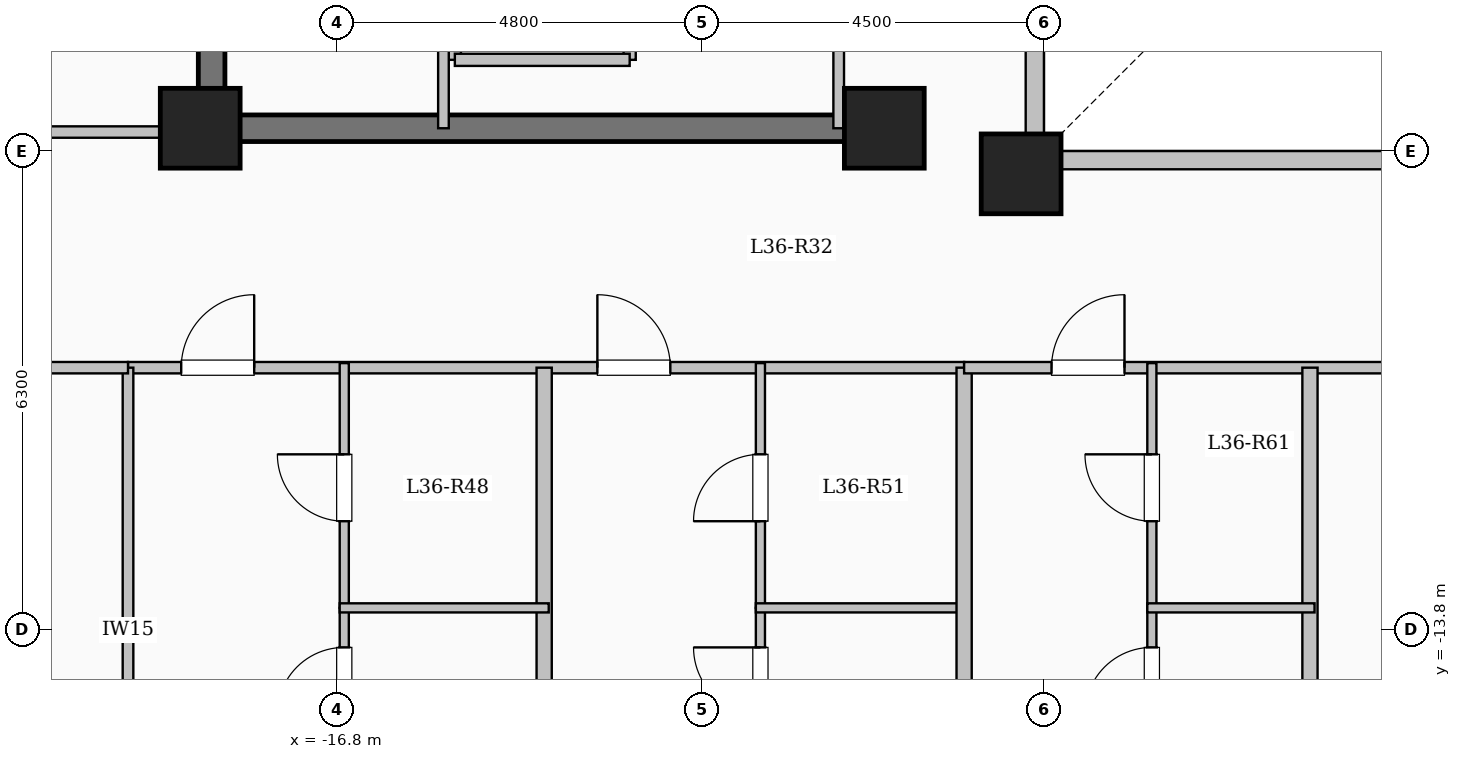
"""IFC4 building model, lengths in metres.
Left out: names, types, materials, properties, quantities, classifications, styles, units other than length and angle.
Written with IfcOpenShell. Run it as: python <this file> out.ifc"""

import sys

from ifc_helpers import new_model, si_unit, direction, frame, frame_2d, origin, origin_2d, place, context, subcontext, project, spatial, rectangle, extrude, element, fill, save


model = new_model("IFC4")
c1 = context("Model", 3, precision=1e-05, world=origin(), true_north=direction((0.0, 1.0)))
c2 = subcontext(c1, "Body", "Model", "MODEL_VIEW")
j1 = project(units=[si_unit("LENGTHUNIT", "METRE"), si_unit("PLANEANGLEUNIT", "RADIAN")], contexts=[c1])
p1 = place(None, origin())
s1 = spatial("IfcSite", under=j1, at=p1, CompositionType="ELEMENT")
p2 = place(p1, origin())
s2 = spatial("IfcBuilding", under=s1, at=p2, CompositionType="ELEMENT")
p3 = place(p2, frame((0.0, 0.0, 135.95)))
s3 = spatial("IfcBuildingStorey", under=s2, at=p3, CompositionType="ELEMENT", Elevation=135.95)
for number, where, z_axis, x_axis in (
    (1, (-7.8, -7.8, 0.0), (0.0, 0.0, 1.0), (1.0, 0.0, 0.0)),
    (2, (-9.6, -7.2, 0.0), (0.0, 0.0, 1.0), (1.0, 0.0, 0.0)),
    (3, (-18.6, -7.2, 0.0), (0.0, 0.0, 1.0), (1.0, 0.0, 0.0)),
):
    element("IfcColumn", number, at=place(p3, frame(where, z_axis=z_axis, x_axis=x_axis)), inside=s3, PredefinedType="COLUMN", context=c2, shape_type="SweptSolid", body=[
        extrude(rectangle(XDim=1.05, YDim=1.05, at=origin_2d()), origin(), (0.0, 0.0, 1.0), 3.35),
    ])
p4 = place(p3, frame((-7.62, -7.62, 0.0), z_axis=(0.0, 0.0, 1.0), x_axis=(1.0, 0.0, 0.0)))
e4 = element("IfcWall", 4, at=p4, inside=s3, PredefinedType="SOLIDWALL", context=c2, shape_type="SweptSolid", body=[
    extrude(rectangle(XDim=15.24, YDim=0.24, at=frame_2d((7.62, 0.0))), origin(), (0.0, 0.0, 1.0), 3.1),
])
p5 = place(p4, frame((6.92, 0.0, 0.95)))
e5 = element("IfcOpeningElement", 5, at=p5, cuts=e4, PredefinedType="OPENING", context=c2, shape_type="SweptSolid", body=[
    extrude(rectangle(XDim=1.4, YDim=1.5, at=frame_2d((0.7, 0.75))), frame((0.0, 0.13, 0.0), z_axis=(0.0, -1.0, 0.0), x_axis=(1.0, 0.0, 0.0)), (0.0, 0.0, 1.0), 0.26),
])
p6 = place(p3, frame((-7.62, 7.62, 0.0), z_axis=(0.0, 0.0, 1.0), x_axis=(0.0, -1.0, 0.0)))
e6 = element("IfcWall", 6, at=p6, inside=s3, PredefinedType="SOLIDWALL", context=c2, shape_type="SweptSolid", body=[
    extrude(rectangle(XDim=15.24, YDim=0.24, at=frame_2d((7.62, 0.0))), origin(), (0.0, 0.0, 1.0), 3.1),
])
p7 = place(p6, frame((6.92, 0.0, 0.95)))
e7 = element("IfcOpeningElement", 7, at=p7, cuts=e6, PredefinedType="OPENING", context=c2, shape_type="SweptSolid", body=[
    extrude(rectangle(XDim=1.4, YDim=1.5, at=frame_2d((0.7, 0.75))), frame((0.0, 0.13, 0.0), z_axis=(0.0, -1.0, 0.0), x_axis=(1.0, 0.0, 0.0)), (0.0, 0.0, 1.0), 0.26),
])
for number, where, z_axis, x_axis in (
    (8, (-15.25, -6.3, 0.0), (0.0, 0.0, 1.0), (0.0, 1.0, 0.0)),
    (9, (-12.95, -6.3, 0.0), (0.0, 0.0, 1.0), (0.0, 1.0, 0.0)),
):
    element("IfcWall", number, at=place(p3, frame(where, z_axis=z_axis, x_axis=x_axis)), inside=s3, PredefinedType="SOLIDWALL", context=c2, shape_type="SweptSolid", body=[
        extrude(rectangle(XDim=2.6, YDim=0.16, at=frame_2d((1.3, 0.0))), origin(), (0.0, 0.0, 1.0), 3.1),
    ])
p8 = place(p3, frame((-15.25, -6.3, 0.0), z_axis=(0.0, 0.0, 1.0), x_axis=(1.0, 0.0, 0.0)))
e10 = element("IfcWall", 10, at=p8, inside=s3, PredefinedType="SOLIDWALL", context=c2, shape_type="SweptSolid", body=[
    extrude(rectangle(XDim=2.3, YDim=0.16, at=frame_2d((1.15, 0.0))), origin(), (0.0, 0.0, 1.0), 3.1),
])
p9 = place(p3, frame((-18.45, -7.375, 0.0), z_axis=(0.0, 0.0, 1.0), x_axis=(0.0, 1.0, 0.0)))
e11 = element("IfcWall", 11, at=p9, inside=s3, PredefinedType="SHEAR", context=c2, shape_type="SweptSolid", body=[
    extrude(rectangle(XDim=14.05, YDim=0.35, at=frame_2d((7.025, 0.0))), origin(), (0.0, 0.0, 1.0), 3.35),
])
p10 = place(p3, frame((-18.625, -7.2, 0.0), z_axis=(0.0, 0.0, 1.0), x_axis=(1.0, 0.0, 0.0)))
e12 = element("IfcWall", 12, at=p10, inside=s3, PredefinedType="SHEAR", context=c2, shape_type="SweptSolid", body=[
    extrude(rectangle(XDim=8.55, YDim=0.35, at=frame_2d((4.275, 0.0))), origin(), (0.0, 0.0, 1.0), 3.35),
])
p11 = place(p3, frame((-15.4, -7.2, 0.0), z_axis=(0.0, 0.0, 1.0), x_axis=(0.0, 1.0, 0.0)))
e13 = element("IfcWall", 13, at=p11, inside=s3, PredefinedType="PARTITIONING", context=c2, shape_type="SweptSolid", body=[
    extrude(rectangle(XDim=10.45, YDim=0.14, at=frame_2d((5.225, 0.0))), origin(), (0.0, 0.0, 1.0), 3.1),
])
p12 = place(p11, frame((9.25, 0.0, 0.0)))
e14 = element("IfcOpeningElement", 14, at=p12, cuts=e13, PredefinedType="OPENING", context=c2, shape_type="SweptSolid", body=[
    extrude(rectangle(XDim=0.9, YDim=2.08, at=frame_2d((0.45, 1.04))), frame((0.0, 0.08, 0.0), z_axis=(0.0, -1.0, 0.0), x_axis=(1.0, 0.0, 0.0)), (0.0, 0.0, 1.0), 0.16),
])
p13 = place(p3, frame((-10.2, -7.2, 0.0), z_axis=(0.0, 0.0, 1.0), x_axis=(0.0, 1.0, 0.0)))
e15 = element("IfcWall", 15, at=p13, inside=s3, PredefinedType="PARTITIONING", context=c2, shape_type="SweptSolid", body=[
    extrude(rectangle(XDim=9.12, YDim=0.14, at=frame_2d((4.56, 0.0))), origin(), (0.0, 0.0, 1.0), 3.1),
])
p14 = place(p13, frame((1.9, 0.0, 0.0)))
e16 = element("IfcOpeningElement", 16, at=p14, cuts=e15, PredefinedType="OPENING", context=c2, shape_type="SweptSolid", body=[
    extrude(rectangle(XDim=0.95, YDim=2.12, at=frame_2d((0.475, 1.06))), frame((0.0, 0.08, 0.0), z_axis=(0.0, -1.0, 0.0), x_axis=(1.0, 0.0, 0.0)), (0.0, 0.0, 1.0), 0.16),
])
p15 = place(p13, frame((7.75, 0.0, 0.0)))
e17 = element("IfcOpeningElement", 17, at=p15, cuts=e15, PredefinedType="OPENING", context=c2, shape_type="SweptSolid", body=[
    extrude(rectangle(XDim=0.95, YDim=2.12, at=frame_2d((0.475, 1.06))), frame((0.0, 0.08, 0.0), z_axis=(0.0, -1.0, 0.0), x_axis=(1.0, 0.0, 0.0)), (0.0, 0.0, 1.0), 0.16),
])
p16 = place(p3, frame((-19.55, -10.35, 0.0), z_axis=(0.0, 0.0, 1.0), x_axis=(1.0, 0.0, 0.0)))
e18 = element("IfcWall", 18, at=p16, inside=s3, PredefinedType="PARTITIONING", context=c2, shape_type="SweptSolid", body=[
    extrude(rectangle(XDim=11.0, YDim=0.15, at=frame_2d((5.5, 0.0))), origin(), (0.0, 0.0, 1.0), 3.1),
])
p17 = place(p16, frame((0.7, 0.0, 0.0)))
e19 = element("IfcOpeningElement", 19, at=p17, cuts=e18, PredefinedType="OPENING", context=c2, shape_type="SweptSolid", body=[
    extrude(rectangle(XDim=0.96, YDim=2.15, at=frame_2d((0.48, 1.075))), frame((0.0, 0.085, 0.0), z_axis=(0.0, -1.0, 0.0), x_axis=(1.0, 0.0, 0.0)), (0.0, 0.0, 1.0), 0.17),
])
p18 = place(p16, frame((6.175, 0.0, 0.0)))
e20 = element("IfcOpeningElement", 20, at=p18, cuts=e18, PredefinedType="OPENING", context=c2, shape_type="SweptSolid", body=[
    extrude(rectangle(XDim=0.96, YDim=2.15, at=frame_2d((0.48, 1.075))), frame((0.0, 0.085, 0.0), z_axis=(0.0, -1.0, 0.0), x_axis=(1.0, 0.0, 0.0)), (0.0, 0.0, 1.0), 0.17),
])
p19 = place(p3, frame((-14.075, -21.2, 0.0), z_axis=(0.0, 0.0, 1.0), x_axis=(0.0, 1.0, 0.0)))
e21 = element("IfcWall", 21, at=p19, inside=s3, PredefinedType="SOLIDWALL", context=c2, shape_type="SweptSolid", body=[
    extrude(rectangle(XDim=10.85, YDim=0.2, at=frame_2d((5.425, 0.0))), origin(), (0.0, 0.0, 1.0), 3.1),
])
p20 = place(p3, frame((-16.705, -21.2, 0.0), z_axis=(0.0, 0.0, 1.0), x_axis=(0.0, 1.0, 0.0)))
e22 = element("IfcWall", 22, at=p20, inside=s3, PredefinedType="PARTITIONING", context=c2, shape_type="SweptSolid", body=[
    extrude(rectangle(XDim=7.69, YDim=0.12, at=frame_2d((3.845, 0.0))), origin(), (0.0, 0.0, 1.0), 3.1),
])
p21 = place(p20, frame((6.29, 0.0, 0.0)))
e23 = element("IfcOpeningElement", 23, at=p21, cuts=e22, PredefinedType="OPENING", context=c2, shape_type="SweptSolid", body=[
    extrude(rectangle(XDim=0.88, YDim=2.1, at=frame_2d((0.44, 1.05))), frame((0.0, 0.07, 0.0), z_axis=(0.0, -1.0, 0.0), x_axis=(1.0, 0.0, 0.0)), (0.0, 0.0, 1.0), 0.14),
])
p22 = place(p3, frame((-16.705, -13.51, 0.0), z_axis=(0.0, 0.0, 1.0), x_axis=(0.0, 1.0, 0.0)))
e24 = element("IfcWall", 24, at=p22, inside=s3, PredefinedType="PARTITIONING", context=c2, shape_type="SweptSolid", body=[
    extrude(rectangle(XDim=3.22, YDim=0.12, at=frame_2d((1.61, 0.0))), origin(), (0.0, 0.0, 1.0), 3.1),
])
p23 = place(p22, frame((1.14, 0.0, 0.0)))
e25 = element("IfcOpeningElement", 25, at=p23, cuts=e24, PredefinedType="OPENING", context=c2, shape_type="SweptSolid", body=[
    extrude(rectangle(XDim=0.88, YDim=2.1, at=frame_2d((0.44, 1.05))), frame((0.0, 0.07, 0.0), z_axis=(0.0, -1.0, 0.0), x_axis=(1.0, 0.0, 0.0)), (0.0, 0.0, 1.0), 0.14),
])
p24 = place(p3, frame((-16.765, -13.51, 0.0), z_axis=(0.0, 0.0, 1.0), x_axis=(1.0, 0.0, 0.0)))
e26 = element("IfcWall", 26, at=p24, inside=s3, PredefinedType="PARTITIONING", context=c2, shape_type="SweptSolid", body=[
    extrude(rectangle(XDim=2.75, YDim=0.12, at=frame_2d((1.375, 0.0))), origin(), (0.0, 0.0, 1.0), 3.1),
])
p25 = place(p3, frame((-11.23, -21.2, 0.0), z_axis=(0.0, 0.0, 1.0), x_axis=(0.0, 1.0, 0.0)))
e27 = element("IfcWall", 27, at=p25, inside=s3, PredefinedType="PARTITIONING", context=c2, shape_type="SweptSolid", body=[
    extrude(rectangle(XDim=7.69, YDim=0.12, at=frame_2d((3.845, 0.0))), origin(), (0.0, 0.0, 1.0), 3.1),
])
p26 = place(p25, frame((6.29, 0.0, 0.0)))
e28 = element("IfcOpeningElement", 28, at=p26, cuts=e27, PredefinedType="OPENING", context=c2, shape_type="SweptSolid", body=[
    extrude(rectangle(XDim=0.88, YDim=2.1, at=frame_2d((0.44, 1.05))), frame((0.0, 0.07, 0.0), z_axis=(0.0, -1.0, 0.0), x_axis=(1.0, 0.0, 0.0)), (0.0, 0.0, 1.0), 0.14),
])
p27 = place(p3, frame((-11.23, -13.51, 0.0), z_axis=(0.0, 0.0, 1.0), x_axis=(0.0, 1.0, 0.0)))
e29 = element("IfcWall", 29, at=p27, inside=s3, PredefinedType="PARTITIONING", context=c2, shape_type="SweptSolid", body=[
    extrude(rectangle(XDim=3.22, YDim=0.12, at=frame_2d((1.61, 0.0))), origin(), (0.0, 0.0, 1.0), 3.1),
])
p28 = place(p27, frame((1.14, 0.0, 0.0)))
e30 = element("IfcOpeningElement", 30, at=p28, cuts=e29, PredefinedType="OPENING", context=c2, shape_type="SweptSolid", body=[
    extrude(rectangle(XDim=0.88, YDim=2.1, at=frame_2d((0.44, 1.05))), frame((0.0, 0.07, 0.0), z_axis=(0.0, -1.0, 0.0), x_axis=(1.0, 0.0, 0.0)), (0.0, 0.0, 1.0), 0.14),
])
p29 = place(p3, frame((-11.29, -13.51, 0.0), z_axis=(0.0, 0.0, 1.0), x_axis=(1.0, 0.0, 0.0)))
e31 = element("IfcWall", 31, at=p29, inside=s3, PredefinedType="PARTITIONING", context=c2, shape_type="SweptSolid", body=[
    extrude(rectangle(XDim=2.75, YDim=0.12, at=frame_2d((1.375, 0.0))), origin(), (0.0, 0.0, 1.0), 3.1),
])
p30 = place(p3, frame((-8.55, -21.804, 0.0), z_axis=(0.0, 0.0, 1.0), x_axis=(0.0, 1.0, 0.0)))
e32 = element("IfcWall", 32, at=p30, inside=s3, PredefinedType="SOLIDWALL", context=c2, shape_type="SweptSolid", body=[
    extrude(rectangle(XDim=11.454, YDim=0.2, at=frame_2d((5.727, 0.0))), origin(), (0.0, 0.0, 1.0), 3.1),
])
p31 = place(p3, frame((-8.55, -10.35, 0.0), z_axis=(0.0, 0.0, 1.0), x_axis=(1.0, 0.0, 0.0)))
e33 = element("IfcWall", 33, at=p31, inside=s3, PredefinedType="PARTITIONING", context=c2, shape_type="SweptSolid", body=[
    extrude(rectangle(XDim=17.1, YDim=0.15, at=frame_2d((8.55, 0.0))), origin(), (0.0, 0.0, 1.0), 3.1),
])
p32 = place(p31, frame((1.15, 0.0, 0.0)))
e34 = element("IfcOpeningElement", 34, at=p32, cuts=e33, PredefinedType="OPENING", context=c2, shape_type="SweptSolid", body=[
    extrude(rectangle(XDim=0.96, YDim=2.15, at=frame_2d((0.48, 1.075))), frame((0.0, 0.085, 0.0), z_axis=(0.0, -1.0, 0.0), x_axis=(1.0, 0.0, 0.0)), (0.0, 0.0, 1.0), 0.17),
])
p33 = place(p31, frame((10.5, 0.0, 0.0)))
e35 = element("IfcOpeningElement", 35, at=p33, cuts=e33, PredefinedType="OPENING", context=c2, shape_type="SweptSolid", body=[
    extrude(rectangle(XDim=0.96, YDim=2.15, at=frame_2d((0.48, 1.075))), frame((0.0, 0.085, 0.0), z_axis=(0.0, -1.0, 0.0), x_axis=(1.0, 0.0, 0.0)), (0.0, 0.0, 1.0), 0.17),
])
p34 = place(p3, frame((-4.0, -21.15, 0.0), z_axis=(0.0, 0.0, 1.0), x_axis=(0.0, 1.0, 0.0)))
e36 = element("IfcWall", 36, at=p34, inside=s3, PredefinedType="SOLIDWALL", context=c2, shape_type="SweptSolid", body=[
    extrude(rectangle(XDim=10.8, YDim=0.2, at=frame_2d((5.4, 0.0))), origin(), (0.0, 0.0, 1.0), 3.1),
])
p35 = place(p3, frame((-6.08, -22.414, 0.0), z_axis=(0.0, 0.0, 1.0), x_axis=(0.0, 1.0, 0.0)))
e37 = element("IfcWall", 37, at=p35, inside=s3, PredefinedType="PARTITIONING", context=c2, shape_type="SweptSolid", body=[
    extrude(rectangle(XDim=8.904, YDim=0.12, at=frame_2d((4.452, 0.0))), origin(), (0.0, 0.0, 1.0), 3.1),
])
p36 = place(p35, frame((7.504, 0.0, 0.0)))
e38 = element("IfcOpeningElement", 38, at=p36, cuts=e37, PredefinedType="OPENING", context=c2, shape_type="SweptSolid", body=[
    extrude(rectangle(XDim=0.88, YDim=2.1, at=frame_2d((0.44, 1.05))), frame((0.0, 0.07, 0.0), z_axis=(0.0, -1.0, 0.0), x_axis=(1.0, 0.0, 0.0)), (0.0, 0.0, 1.0), 0.14),
])
p37 = place(p3, frame((-6.08, -13.51, 0.0), z_axis=(0.0, 0.0, 1.0), x_axis=(0.0, 1.0, 0.0)))
e39 = element("IfcWall", 39, at=p37, inside=s3, PredefinedType="PARTITIONING", context=c2, shape_type="SweptSolid", body=[
    extrude(rectangle(XDim=3.22, YDim=0.12, at=frame_2d((1.61, 0.0))), origin(), (0.0, 0.0, 1.0), 3.1),
])
p38 = place(p37, frame((1.14, 0.0, 0.0)))
e40 = element("IfcOpeningElement", 40, at=p38, cuts=e39, PredefinedType="OPENING", context=c2, shape_type="SweptSolid", body=[
    extrude(rectangle(XDim=0.88, YDim=2.1, at=frame_2d((0.44, 1.05))), frame((0.0, 0.07, 0.0), z_axis=(0.0, -1.0, 0.0), x_axis=(1.0, 0.0, 0.0)), (0.0, 0.0, 1.0), 0.14),
])
p39 = place(p3, frame((-6.14, -13.51, 0.0), z_axis=(0.0, 0.0, 1.0), x_axis=(1.0, 0.0, 0.0)))
e41 = element("IfcWall", 41, at=p39, inside=s3, PredefinedType="PARTITIONING", context=c2, shape_type="SweptSolid", body=[
    extrude(rectangle(XDim=2.2, YDim=0.12, at=frame_2d((1.1, 0.0))), origin(), (0.0, 0.0, 1.0), 3.1),
])
p40 = place(p3, frame((-25.08, -7.25, 0.0), z_axis=(0.0, 0.0, 1.0), x_axis=(1.0, 0.0, 0.0)))
e42 = element("IfcWall", 42, at=p40, inside=s3, PredefinedType="PARTITIONING", context=c2, shape_type="SweptSolid", body=[
    extrude(rectangle(XDim=6.63, YDim=0.15, at=frame_2d((3.315, 0.0))), origin(), (0.0, 0.0, 1.0), 3.1),
])
p41 = place(p40, frame((3.53, 0.0, 0.0)))
e43 = element("IfcOpeningElement", 43, at=p41, cuts=e42, PredefinedType="OPENING", context=c2, shape_type="SweptSolid", body=[
    extrude(rectangle(XDim=0.96, YDim=2.15, at=frame_2d((0.48, 1.075))), frame((0.0, 0.085, 0.0), z_axis=(0.0, -1.0, 0.0), x_axis=(1.0, 0.0, 0.0)), (0.0, 0.0, 1.0), 0.17),
])
p42 = place(p3, frame((-19.55, -17.25, 0.0), z_axis=(0.0, 0.0, 1.0), x_axis=(0.0, 1.0, 0.0)))
e44 = element("IfcWall", 44, at=p42, inside=s3, PredefinedType="PARTITIONING", context=c2, shape_type="SweptSolid", body=[
    extrude(rectangle(XDim=6.9, YDim=0.14, at=frame_2d((3.45, 0.0))), origin(), (0.0, 0.0, 1.0), 3.1),
])
p43 = place(p3, frame((-25.08, -10.35, 0.0), z_axis=(0.0, 0.0, 1.0), x_axis=(1.0, 0.0, 0.0)))
e45 = element("IfcWall", 45, at=p43, inside=s3, PredefinedType="PARTITIONING", context=c2, shape_type="SweptSolid", body=[
    extrude(rectangle(XDim=5.53, YDim=0.15, at=frame_2d((2.765, 0.0))), origin(), (0.0, 0.0, 1.0), 3.1),
])
p44 = place(p43, frame((2.29, 0.0, 0.0)))
e46 = element("IfcOpeningElement", 46, at=p44, cuts=e45, PredefinedType="OPENING", context=c2, shape_type="SweptSolid", body=[
    extrude(rectangle(XDim=0.95, YDim=2.15, at=frame_2d((0.475, 1.075))), frame((0.0, 0.085, 0.0), z_axis=(0.0, -1.0, 0.0), x_axis=(1.0, 0.0, 0.0)), (0.0, 0.0, 1.0), 0.17),
])
p45 = place(p17, origin())
e47 = element("IfcDoor", 47, at=p45, inside=s3, OperationType="SINGLE_SWING_RIGHT", PredefinedType="DOOR", context=c2, shape_type="SweptSolid", body=[
    extrude(rectangle(XDim=0.96, YDim=2.15, at=frame_2d((0.48, 1.075))), frame((0.0, 0.025, 0.0), z_axis=(0.0, -1.0, 0.0), x_axis=(1.0, 0.0, 0.0)), (0.0, 0.0, 1.0), 0.05),
])
fill(e19, e47)
p46 = place(p21, origin())
e48 = element("IfcDoor", 48, at=p46, inside=s3, OperationType="SINGLE_SWING_LEFT", PredefinedType="DOOR", context=c2, shape_type="SweptSolid", body=[
    extrude(rectangle(XDim=0.88, YDim=2.1, at=frame_2d((0.44, 1.05))), frame((0.0, 0.025, 0.0), z_axis=(0.0, -1.0, 0.0), x_axis=(1.0, 0.0, 0.0)), (0.0, 0.0, 1.0), 0.05),
])
fill(e23, e48)
p47 = place(p23, origin())
e49 = element("IfcDoor", 49, at=p47, inside=s3, OperationType="SINGLE_SWING_RIGHT", PredefinedType="DOOR", context=c2, shape_type="SweptSolid", body=[
    extrude(rectangle(XDim=0.88, YDim=2.1, at=frame_2d((0.44, 1.05))), frame((0.0, 0.025, 0.0), z_axis=(0.0, -1.0, 0.0), x_axis=(1.0, 0.0, 0.0)), (0.0, 0.0, 1.0), 0.05),
])
fill(e25, e49)
p48 = place(p18, origin())
e50 = element("IfcDoor", 50, at=p48, inside=s3, OperationType="SINGLE_SWING_LEFT", PredefinedType="DOOR", context=c2, shape_type="SweptSolid", body=[
    extrude(rectangle(XDim=0.96, YDim=2.15, at=frame_2d((0.48, 1.075))), frame((0.0, 0.025, 0.0), z_axis=(0.0, -1.0, 0.0), x_axis=(1.0, 0.0, 0.0)), (0.0, 0.0, 1.0), 0.05),
])
fill(e20, e50)
p49 = place(p26, origin())
e51 = element("IfcDoor", 51, at=p49, inside=s3, OperationType="SINGLE_SWING_RIGHT", PredefinedType="DOOR", context=c2, shape_type="SweptSolid", body=[
    extrude(rectangle(XDim=0.88, YDim=2.1, at=frame_2d((0.44, 1.05))), frame((0.0, 0.025, 0.0), z_axis=(0.0, -1.0, 0.0), x_axis=(1.0, 0.0, 0.0)), (0.0, 0.0, 1.0), 0.05),
])
fill(e28, e51)
p50 = place(p28, origin())
e52 = element("IfcDoor", 52, at=p50, inside=s3, OperationType="SINGLE_SWING_LEFT", PredefinedType="DOOR", context=c2, shape_type="SweptSolid", body=[
    extrude(rectangle(XDim=0.88, YDim=2.1, at=frame_2d((0.44, 1.05))), frame((0.0, 0.025, 0.0), z_axis=(0.0, -1.0, 0.0), x_axis=(1.0, 0.0, 0.0)), (0.0, 0.0, 1.0), 0.05),
])
fill(e30, e52)
p51 = place(p32, origin())
e53 = element("IfcDoor", 53, at=p51, inside=s3, OperationType="SINGLE_SWING_RIGHT", PredefinedType="DOOR", context=c2, shape_type="SweptSolid", body=[
    extrude(rectangle(XDim=0.96, YDim=2.15, at=frame_2d((0.48, 1.075))), frame((0.0, 0.025, 0.0), z_axis=(0.0, -1.0, 0.0), x_axis=(1.0, 0.0, 0.0)), (0.0, 0.0, 1.0), 0.05),
])
fill(e34, e53)
p52 = place(p36, origin())
e54 = element("IfcDoor", 54, at=p52, inside=s3, OperationType="SINGLE_SWING_LEFT", PredefinedType="DOOR", context=c2, shape_type="SweptSolid", body=[
    extrude(rectangle(XDim=0.88, YDim=2.1, at=frame_2d((0.44, 1.05))), frame((0.0, 0.025, 0.0), z_axis=(0.0, -1.0, 0.0), x_axis=(1.0, 0.0, 0.0)), (0.0, 0.0, 1.0), 0.05),
])
fill(e38, e54)
p53 = place(p38, origin())
e55 = element("IfcDoor", 55, at=p53, inside=s3, OperationType="SINGLE_SWING_RIGHT", PredefinedType="DOOR", context=c2, shape_type="SweptSolid", body=[
    extrude(rectangle(XDim=0.88, YDim=2.1, at=frame_2d((0.44, 1.05))), frame((0.0, 0.025, 0.0), z_axis=(0.0, -1.0, 0.0), x_axis=(1.0, 0.0, 0.0)), (0.0, 0.0, 1.0), 0.05),
])
fill(e40, e55)
save(model, sys.argv[1])
